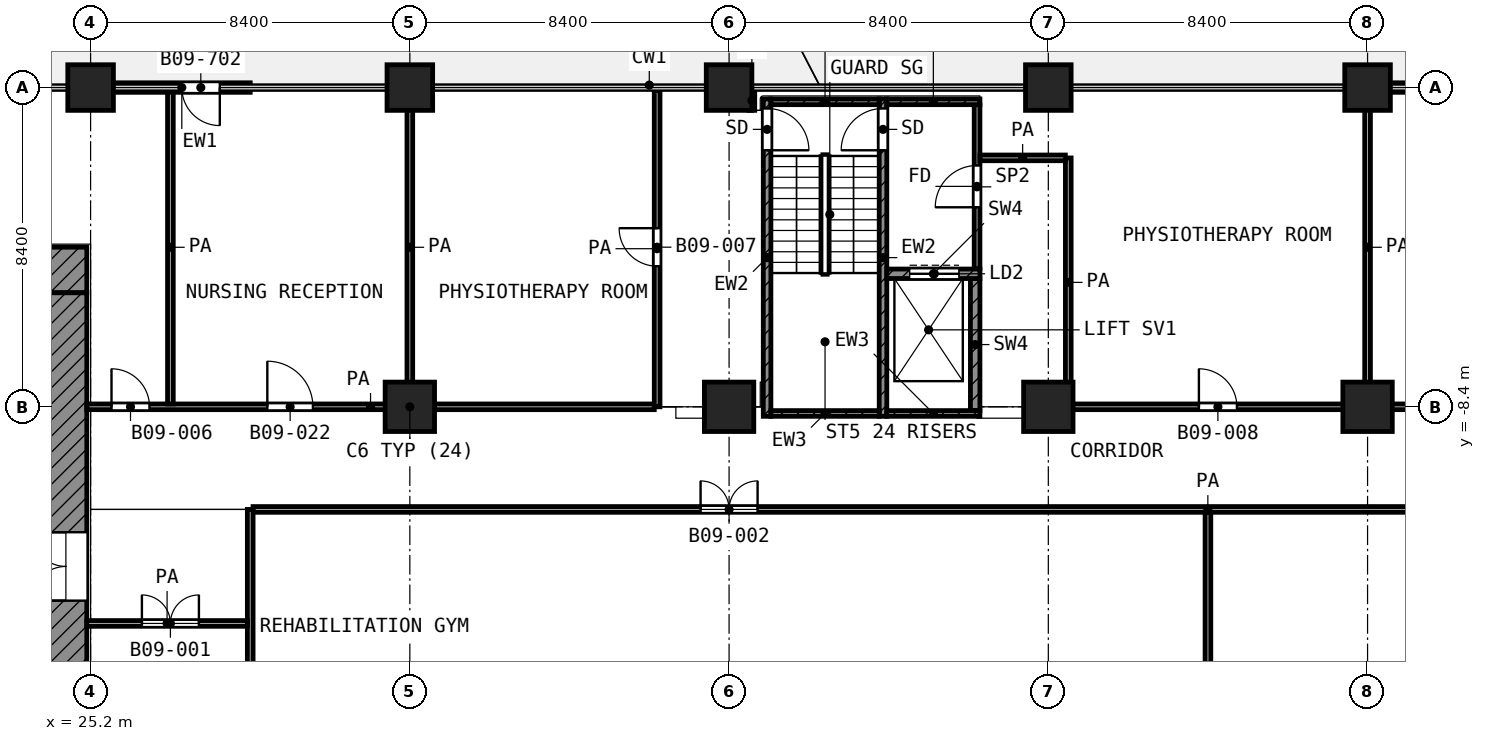
"""IFC4 building model, lengths in metres.
Left out: names, types, materials, properties, quantities, classifications, styles, units other than length and angle.
Written with IfcOpenShell. Run it as: python <this file> out.ifc"""

import sys

from ifc_helpers import new_model, si_unit, direction, frame, frame_2d, origin, origin_2d, place, context, subcontext, project, spatial, rectangle, extrude, element, fill, save


model = new_model("IFC4")
c1 = context("Model", 3, precision=1e-05, world=origin(), true_north=direction((0.0, 1.0)))
c2 = subcontext(c1, "Body", "Model", "MODEL_VIEW")
j1 = project(units=[si_unit("LENGTHUNIT", "METRE"), si_unit("PLANEANGLEUNIT", "RADIAN")], contexts=[c1])
p1 = place(None, origin())
s1 = spatial("IfcSite", under=j1, at=p1, CompositionType="ELEMENT")
p2 = place(p1, origin())
s2 = spatial("IfcBuilding", under=s1, at=p2, CompositionType="ELEMENT")
p3 = place(p2, frame((0.0, 0.0, 43.4)))
s3 = spatial("IfcBuildingStorey", under=s2, at=p3, CompositionType="ELEMENT", Elevation=43.4)
for number, where, z_axis, x_axis in (
    (1, (25.2, 0.0, 0.0), (0.0, 0.0, 1.0), (1.0, 0.0, 0.0)),
    (2, (33.6, 0.0, 0.0), (0.0, 0.0, 1.0), (1.0, 0.0, 0.0)),
    (3, (42.0, 0.0, 0.0), (0.0, 0.0, 1.0), (1.0, 0.0, 0.0)),
    (4, (50.4, 0.0, 0.0), (0.0, 0.0, 1.0), (1.0, 0.0, 0.0)),
    (5, (58.8, 0.0, 0.0), (0.0, 0.0, 1.0), (1.0, 0.0, 0.0)),
):
    element("IfcColumn", number, at=place(p3, frame(where, z_axis=z_axis, x_axis=x_axis)), inside=s3, PredefinedType="COLUMN", context=c2, shape_type="SweptSolid", body=[
        extrude(rectangle(XDim=1.2, YDim=1.2, at=origin_2d()), origin(), (0.0, 0.0, 1.0), 4.2),
    ])
for number, where, z_axis, x_axis in (
    (6, (33.6, -8.4, 0.0), (0.0, 0.0, 1.0), (1.0, 0.0, 0.0)),
    (7, (42.0, -8.4, 0.0), (0.0, 0.0, 1.0), (1.0, 0.0, 0.0)),
    (8, (50.4, -8.4, 0.0), (0.0, 0.0, 1.0), (1.0, 0.0, 0.0)),
    (9, (58.8, -8.4, 0.0), (0.0, 0.0, 1.0), (1.0, 0.0, 0.0)),
):
    element("IfcColumn", number, at=place(p3, frame(where, z_axis=z_axis, x_axis=x_axis)), inside=s3, PredefinedType="COLUMN", context=c2, shape_type="SweptSolid", body=[
        extrude(rectangle(XDim=1.3, YDim=1.3, at=origin_2d()), origin(), (0.0, 0.0, 1.0), 4.2),
    ])
p4 = place(p3, frame((63.0, 0.0, 0.0), z_axis=(0.0, 0.0, 1.0), x_axis=(-1.0, 0.0, 0.0)))
e10 = element("IfcWall", 10, at=p4, inside=s3, PredefinedType="SOLIDWALL", context=c2, shape_type="SweptSolid", body=[
    extrude(rectangle(XDim=3.6, YDim=0.25, at=frame_2d((1.8, 0.0))), origin(), (0.0, 0.0, 1.0), 3.78),
])
p5 = place(p4, frame((0.9, 0.0, 0.0)))
e11 = element("IfcOpeningElement", 11, at=p5, cuts=e10, PredefinedType="OPENING", context=c2, shape_type="SweptSolid", body=[
    extrude(rectangle(XDim=1.8, YDim=2.1, at=frame_2d((0.9, 1.05))), frame((0.0, 0.135, 0.0), z_axis=(0.0, -1.0, 0.0), x_axis=(1.0, 0.0, 0.0)), (0.0, 0.0, 1.0), 0.27),
])
p6 = place(p3, frame((29.4, 0.0, 0.0), z_axis=(0.0, 0.0, 1.0), x_axis=(-1.0, 0.0, 0.0)))
e12 = element("IfcWall", 12, at=p6, inside=s3, PredefinedType="SOLIDWALL", context=c2, shape_type="SweptSolid", body=[
    extrude(rectangle(XDim=3.6, YDim=0.25, at=frame_2d((1.8, 0.0))), origin(), (0.0, 0.0, 1.0), 3.78),
])
p7 = place(p6, frame((0.8, 0.0, 0.0)))
e13 = element("IfcOpeningElement", 13, at=p7, cuts=e12, PredefinedType="OPENING", context=c2, shape_type="SweptSolid", body=[
    extrude(rectangle(XDim=1.0, YDim=2.1, at=frame_2d((0.5, 1.05))), frame((0.0, 0.135, 0.0), z_axis=(0.0, -1.0, 0.0), x_axis=(1.0, 0.0, 0.0)), (0.0, 0.0, 1.0), 0.27),
])
p8 = place(p3, frame((4.2, -4.8, 0.0), z_axis=(0.0, 0.0, 1.0), x_axis=(1.0, 0.0, 0.0)))
e14 = element("IfcWall", 14, at=p8, inside=s3, PredefinedType="SHEAR", context=c2, shape_type="SweptSolid", body=[
    extrude(rectangle(XDim=20.9, YDim=1.2, at=frame_2d((10.45, 0.0))), origin(), (0.0, 0.0, 1.0), 3.9),
])
p9 = place(p8, frame((1.95, 0.0, 0.0)))
e15 = element("IfcOpeningElement", 15, at=p9, cuts=e14, PredefinedType="OPENING", context=c2, shape_type="SweptSolid", body=[
    extrude(rectangle(XDim=1.1, YDim=2.1, at=frame_2d((0.55, 1.05))), frame((0.0, 0.61, 0.0), z_axis=(0.0, -1.0, 0.0), x_axis=(1.0, 0.0, 0.0)), (0.0, 0.0, 1.0), 1.22),
])
p10 = place(p8, frame((17.95, 0.0, 0.0)))
e16 = element("IfcOpeningElement", 16, at=p10, cuts=e14, PredefinedType="OPENING", context=c2, shape_type="SweptSolid", body=[
    extrude(rectangle(XDim=1.1, YDim=2.1, at=frame_2d((0.55, 1.05))), frame((0.0, 0.61, 0.0), z_axis=(0.0, -1.0, 0.0), x_axis=(1.0, 0.0, 0.0)), (0.0, 0.0, 1.0), 1.22),
])
p11 = place(p3, frame((24.55, -24.0, 0.0), z_axis=(0.0, 0.0, 1.0), x_axis=(0.0, 1.0, 0.0)))
e17 = element("IfcWall", 17, at=p11, inside=s3, PredefinedType="SHEAR", context=c2, shape_type="SweptSolid", body=[
    extrude(rectangle(XDim=18.6, YDim=1.1, at=frame_2d((9.3, 0.0))), origin(), (0.0, 0.0, 1.0), 3.9),
])
p12 = place(p11, frame((10.5, 0.0, 0.0)))
e18 = element("IfcOpeningElement", 18, at=p12, cuts=e17, PredefinedType="OPENING", context=c2, shape_type="SweptSolid", body=[
    extrude(rectangle(XDim=1.8, YDim=2.1, at=frame_2d((0.9, 1.05))), frame((0.0, 0.56, 0.0), z_axis=(0.0, -1.0, 0.0), x_axis=(1.0, 0.0, 0.0)), (0.0, 0.0, 1.0), 1.12),
])
p13 = place(p3, frame((43.0, -8.65, 0.0), z_axis=(0.0, 0.0, 1.0), x_axis=(0.0, 1.0, 0.0)))
e19 = element("IfcWall", 19, at=p13, inside=s3, PredefinedType="SHEAR", context=c2, shape_type="SweptSolid", body=[
    extrude(rectangle(XDim=8.35, YDim=0.2, at=frame_2d((4.175, 0.0))), origin(), (0.0, 0.0, 1.0), 3.9),
])
p14 = place(p13, frame((7.0, 0.0, 0.0)))
e20 = element("IfcOpeningElement", 20, at=p14, cuts=e19, PredefinedType="OPENING", context=c2, shape_type="SweptSolid", body=[
    extrude(rectangle(XDim=1.1, YDim=2.1, at=frame_2d((0.55, 1.05))), frame((0.0, 0.11, 0.0), z_axis=(0.0, -1.0, 0.0), x_axis=(1.0, 0.0, 0.0)), (0.0, 0.0, 1.0), 0.22),
])
p15 = place(p3, frame((46.05, -8.65, 0.0), z_axis=(0.0, 0.0, 1.0), x_axis=(0.0, 1.0, 0.0)))
e21 = element("IfcWall", 21, at=p15, inside=s3, PredefinedType="SHEAR", context=c2, shape_type="SweptSolid", body=[
    extrude(rectangle(XDim=8.35, YDim=0.2, at=frame_2d((4.175, 0.0))), origin(), (0.0, 0.0, 1.0), 3.9),
])
p16 = place(p15, frame((7.0, 0.0, 0.0)))
e22 = element("IfcOpeningElement", 22, at=p16, cuts=e21, PredefinedType="OPENING", context=c2, shape_type="SweptSolid", body=[
    extrude(rectangle(XDim=1.1, YDim=2.1, at=frame_2d((0.55, 1.05))), frame((0.0, 0.11, 0.0), z_axis=(0.0, -1.0, 0.0), x_axis=(1.0, 0.0, 0.0)), (0.0, 0.0, 1.0), 0.22),
])
p17 = place(p3, frame((43.1, -0.375, 0.0), z_axis=(0.0, 0.0, 1.0), x_axis=(1.0, 0.0, 0.0)))
e23 = element("IfcWall", 23, at=p17, inside=s3, PredefinedType="SHEAR", context=c2, shape_type="SweptSolid", body=[
    extrude(rectangle(XDim=2.85, YDim=0.15, at=frame_2d((1.425, 0.0))), origin(), (0.0, 0.0, 1.0), 3.9),
])
p18 = place(p3, frame((46.15, -0.375, 0.0), z_axis=(0.0, 0.0, 1.0), x_axis=(1.0, 0.0, 0.0)))
e24 = element("IfcWall", 24, at=p18, inside=s3, PredefinedType="SHEAR", context=c2, shape_type="SweptSolid", body=[
    extrude(rectangle(XDim=2.45, YDim=0.15, at=frame_2d((1.225, 0.0))), origin(), (0.0, 0.0, 1.0), 3.9),
])
p19 = place(p3, frame((43.1, -8.575, 0.0), z_axis=(0.0, 0.0, 1.0), x_axis=(1.0, 0.0, 0.0)))
e25 = element("IfcWall", 25, at=p19, inside=s3, PredefinedType="SHEAR", context=c2, shape_type="SweptSolid", body=[
    extrude(rectangle(XDim=2.85, YDim=0.15, at=frame_2d((1.425, 0.0))), origin(), (0.0, 0.0, 1.0), 3.9),
])
p20 = place(p3, frame((46.15, -8.575, 0.0), z_axis=(0.0, 0.0, 1.0), x_axis=(1.0, 0.0, 0.0)))
e26 = element("IfcWall", 26, at=p20, inside=s3, PredefinedType="SHEAR", context=c2, shape_type="SweptSolid", body=[
    extrude(rectangle(XDim=2.45, YDim=0.15, at=frame_2d((1.225, 0.0))), origin(), (0.0, 0.0, 1.0), 3.9),
])
p21 = place(p3, frame((46.15, -4.9, 0.0), z_axis=(0.0, 0.0, 1.0), x_axis=(1.0, 0.0, 0.0)))
e27 = element("IfcWall", 27, at=p21, inside=s3, PredefinedType="SHEAR", context=c2, shape_type="SweptSolid", body=[
    extrude(rectangle(XDim=2.45, YDim=0.25, at=frame_2d((1.225, 0.0))), origin(), (0.0, 0.0, 1.0), 3.9),
])
p22 = place(p21, frame((0.6, 0.0, 0.0)))
e28 = element("IfcOpeningElement", 28, at=p22, cuts=e27, PredefinedType="OPENING", context=c2, shape_type="SweptSolid", body=[
    extrude(rectangle(XDim=1.3, YDim=2.1, at=frame_2d((0.65, 1.05))), frame((0.0, 0.135, 0.0), z_axis=(0.0, -1.0, 0.0), x_axis=(1.0, 0.0, 0.0)), (0.0, 0.0, 1.0), 0.27),
])
p23 = place(p3, frame((48.475, -8.5, 0.0), z_axis=(0.0, 0.0, 1.0), x_axis=(0.0, 1.0, 0.0)))
e29 = element("IfcWall", 29, at=p23, inside=s3, PredefinedType="SHEAR", context=c2, shape_type="SweptSolid", body=[
    extrude(rectangle(XDim=3.475, YDim=0.25, at=frame_2d((1.738, 0.0))), origin(), (0.0, 0.0, 1.0), 3.9),
])
p24 = place(p3, frame((48.525, -4.775, 0.0), z_axis=(0.0, 0.0, 1.0), x_axis=(0.0, 1.0, 0.0)))
e30 = element("IfcWall", 30, at=p24, inside=s3, PredefinedType="PARTITIONING", context=c2, shape_type="SweptSolid", body=[
    extrude(rectangle(XDim=4.325, YDim=0.15, at=frame_2d((2.163, 0.0))), origin(), (0.0, 0.0, 1.0), 3.9),
])
p25 = place(p24, frame((1.625, 0.0, 0.0)))
e31 = element("IfcOpeningElement", 31, at=p25, cuts=e30, PredefinedType="OPENING", context=c2, shape_type="SweptSolid", body=[
    extrude(rectangle(XDim=1.1, YDim=2.1, at=frame_2d((0.55, 1.05))), frame((0.0, 0.085, 0.0), z_axis=(0.0, -1.0, 0.0), x_axis=(1.0, 0.0, 0.0)), (0.0, 0.0, 1.0), 0.17),
])
p26 = place(p3, frame((25.1, -14.1, 0.0), z_axis=(0.0, 0.0, 1.0), x_axis=(1.0, 0.0, 0.0)))
e32 = element("IfcWall", 32, at=p26, inside=s3, PredefinedType="PARTITIONING", context=c2, shape_type="SweptSolid", body=[
    extrude(rectangle(XDim=4.225, YDim=0.15, at=frame_2d((2.112, 0.0))), origin(), (0.0, 0.0, 1.0), 3.9),
])
p27 = place(p26, frame((1.45, 0.0, 0.0)))
e33 = element("IfcOpeningElement", 33, at=p27, cuts=e32, PredefinedType="OPENING", context=c2, shape_type="SweptSolid", body=[
    extrude(rectangle(XDim=1.5, YDim=2.1, at=frame_2d((0.75, 1.05))), frame((0.0, 0.085, 0.0), z_axis=(0.0, -1.0, 0.0), x_axis=(1.0, 0.0, 0.0)), (0.0, 0.0, 1.0), 0.17),
])
p28 = place(p3, frame((29.475, -11.1, 0.0), z_axis=(0.0, 0.0, 1.0), x_axis=(1.0, 0.0, 0.0)))
e34 = element("IfcWall", 34, at=p28, inside=s3, PredefinedType="PARTITIONING", context=c2, shape_type="SweptSolid", body=[
    extrude(rectangle(XDim=50.245, YDim=0.15, at=frame_2d((25.123, 0.0))), origin(), (0.0, 0.0, 1.0), 3.9),
])
p29 = place(p28, frame((11.775, 0.0, 0.0)))
e35 = element("IfcOpeningElement", 35, at=p29, cuts=e34, PredefinedType="OPENING", context=c2, shape_type="SweptSolid", body=[
    extrude(rectangle(XDim=1.5, YDim=2.1, at=frame_2d((0.75, 1.05))), frame((0.0, 0.085, 0.0), z_axis=(0.0, -1.0, 0.0), x_axis=(1.0, 0.0, 0.0)), (0.0, 0.0, 1.0), 0.17),
])
p30 = place(p28, frame((36.975, 0.0, 0.0)))
e36 = element("IfcOpeningElement", 36, at=p30, cuts=e34, PredefinedType="OPENING", context=c2, shape_type="SweptSolid", body=[
    extrude(rectangle(XDim=1.5, YDim=2.1, at=frame_2d((0.75, 1.05))), frame((0.0, 0.085, 0.0), z_axis=(0.0, -1.0, 0.0), x_axis=(1.0, 0.0, 0.0)), (0.0, 0.0, 1.0), 0.17),
])
p31 = place(p3, frame((25.1, -8.4, 0.0), z_axis=(0.0, 0.0, 1.0), x_axis=(1.0, 0.0, 0.0)))
e37 = element("IfcWall", 37, at=p31, inside=s3, PredefinedType="PARTITIONING", context=c2, shape_type="SweptSolid", body=[
    extrude(rectangle(XDim=14.932, YDim=0.15, at=frame_2d((7.466, 0.0))), origin(), (0.0, 0.0, 1.0), 3.9),
])
p32 = place(p31, frame((0.65, 0.0, 0.0)))
e38 = element("IfcOpeningElement", 38, at=p32, cuts=e37, PredefinedType="OPENING", context=c2, shape_type="SweptSolid", body=[
    extrude(rectangle(XDim=1.0, YDim=2.1, at=frame_2d((0.5, 1.05))), frame((0.0, 0.085, 0.0), z_axis=(0.0, -1.0, 0.0), x_axis=(1.0, 0.0, 0.0)), (0.0, 0.0, 1.0), 0.17),
])
p33 = place(p31, frame((4.75, 0.0, 0.0)))
e39 = element("IfcOpeningElement", 39, at=p33, cuts=e37, PredefinedType="OPENING", context=c2, shape_type="SweptSolid", body=[
    extrude(rectangle(XDim=1.2, YDim=2.1, at=frame_2d((0.6, 1.05))), frame((0.0, 0.085, 0.0), z_axis=(0.0, -1.0, 0.0), x_axis=(1.0, 0.0, 0.0)), (0.0, 0.0, 1.0), 0.17),
])
p34 = place(p3, frame((51.0, -8.4, 0.0), z_axis=(0.0, 0.0, 1.0), x_axis=(1.0, 0.0, 0.0)))
e40 = element("IfcWall", 40, at=p34, inside=s3, PredefinedType="PARTITIONING", context=c2, shape_type="SweptSolid", body=[
    extrude(rectangle(XDim=28.72, YDim=0.15, at=frame_2d((14.36, 0.0))), origin(), (0.0, 0.0, 1.0), 3.9),
])
p35 = place(p34, frame((3.362, 0.0, 0.0)))
e41 = element("IfcOpeningElement", 41, at=p35, cuts=e40, PredefinedType="OPENING", context=c2, shape_type="SweptSolid", body=[
    extrude(rectangle(XDim=1.0, YDim=2.1, at=frame_2d((0.5, 1.05))), frame((0.0, 0.085, 0.0), z_axis=(0.0, -1.0, 0.0), x_axis=(1.0, 0.0, 0.0)), (0.0, 0.0, 1.0), 0.17),
])
p36 = place(p34, frame((11.5, 0.0, 0.0)))
e42 = element("IfcOpeningElement", 42, at=p36, cuts=e40, PredefinedType="OPENING", context=c2, shape_type="SweptSolid", body=[
    extrude(rectangle(XDim=1.0, YDim=2.1, at=frame_2d((0.5, 1.05))), frame((0.0, 0.085, 0.0), z_axis=(0.0, -1.0, 0.0), x_axis=(1.0, 0.0, 0.0)), (0.0, 0.0, 1.0), 0.17),
])
p37 = place(p34, frame((17.8, 0.0, 0.0)))
e43 = element("IfcOpeningElement", 43, at=p37, cuts=e40, PredefinedType="OPENING", context=c2, shape_type="SweptSolid", body=[
    extrude(rectangle(XDim=1.0, YDim=2.1, at=frame_2d((0.5, 1.05))), frame((0.0, 0.085, 0.0), z_axis=(0.0, -1.0, 0.0), x_axis=(1.0, 0.0, 0.0)), (0.0, 0.0, 1.0), 0.17),
])
p38 = place(p34, frame((22.9, 0.0, 0.0)))
e44 = element("IfcOpeningElement", 44, at=p38, cuts=e40, PredefinedType="OPENING", context=c2, shape_type="SweptSolid", body=[
    extrude(rectangle(XDim=1.0, YDim=2.1, at=frame_2d((0.5, 1.05))), frame((0.0, 0.085, 0.0), z_axis=(0.0, -1.0, 0.0), x_axis=(1.0, 0.0, 0.0)), (0.0, 0.0, 1.0), 0.17),
])
p39 = place(p3, frame((48.6, -1.85, 0.0), z_axis=(0.0, 0.0, 1.0), x_axis=(1.0, 0.0, 0.0)))
e45 = element("IfcWall", 45, at=p39, inside=s3, PredefinedType="PARTITIONING", context=c2, shape_type="SweptSolid", body=[
    extrude(rectangle(XDim=2.248, YDim=0.15, at=frame_2d((1.124, 0.0))), origin(), (0.0, 0.0, 1.0), 3.9),
])
p40 = place(p3, frame((27.3, -8.325, 0.0), z_axis=(0.0, 0.0, 1.0), x_axis=(0.0, 1.0, 0.0)))
e46 = element("IfcWall", 46, at=p40, inside=s3, PredefinedType="PARTITIONING", context=c2, shape_type="SweptSolid", body=[
    extrude(rectangle(XDim=8.245, YDim=0.15, at=frame_2d((4.123, 0.0))), origin(), (0.0, 0.0, 1.0), 3.9),
])
p41 = place(p3, frame((29.4, -25.2, 0.0), z_axis=(0.0, 0.0, 1.0), x_axis=(0.0, 1.0, 0.0)))
e47 = element("IfcWall", 47, at=p41, inside=s3, PredefinedType="PARTITIONING", context=c2, shape_type="SweptSolid", body=[
    extrude(rectangle(XDim=14.1, YDim=0.15, at=frame_2d((7.05, 0.0))), origin(), (0.0, 0.0, 1.0), 3.9),
])
p42 = place(p3, frame((33.6, -8.325, 0.0), z_axis=(0.0, 0.0, 1.0), x_axis=(0.0, 1.0, 0.0)))
e48 = element("IfcWall", 48, at=p42, inside=s3, PredefinedType="PARTITIONING", context=c2, shape_type="SweptSolid", body=[
    extrude(rectangle(XDim=8.245, YDim=0.15, at=frame_2d((4.123, 0.0))), origin(), (0.0, 0.0, 1.0), 3.9),
])
p43 = place(p3, frame((40.107, -8.4, 0.0), z_axis=(0.0, 0.0, 1.0), x_axis=(0.0, 1.0, 0.0)))
e49 = element("IfcWall", 49, at=p43, inside=s3, PredefinedType="PARTITIONING", context=c2, shape_type="SweptSolid", body=[
    extrude(rectangle(XDim=8.32, YDim=0.15, at=frame_2d((4.16, 0.0))), origin(), (0.0, 0.0, 1.0), 3.9),
])
p44 = place(p43, frame((3.7, 0.0, 0.0)))
e50 = element("IfcOpeningElement", 50, at=p44, cuts=e49, PredefinedType="OPENING", context=c2, shape_type="SweptSolid", body=[
    extrude(rectangle(XDim=1.0, YDim=2.1, at=frame_2d((0.5, 1.05))), frame((0.0, 0.085, 0.0), z_axis=(0.0, -1.0, 0.0), x_axis=(1.0, 0.0, 0.0)), (0.0, 0.0, 1.0), 0.17),
])
p45 = place(p3, frame((42.6, -0.599, 0.0), z_axis=(0.0, 0.0, 1.0), x_axis=(0.0, 1.0, 0.0)))
e51 = element("IfcWall", 51, at=p45, inside=s3, PredefinedType="PARTITIONING", context=c2, shape_type="SweptSolid", body=[
    extrude(rectangle(XDim=0.519, YDim=0.15, at=frame_2d((0.26, 0.0))), origin(), (0.0, 0.0, 1.0), 3.9),
])
p46 = place(p3, frame((50.925, -8.4, 0.0), z_axis=(0.0, 0.0, 1.0), x_axis=(0.0, 1.0, 0.0)))
e52 = element("IfcWall", 52, at=p46, inside=s3, PredefinedType="PARTITIONING", context=c2, shape_type="SweptSolid", body=[
    extrude(rectangle(XDim=6.548, YDim=0.15, at=frame_2d((3.274, 0.0))), origin(), (0.0, 0.0, 1.0), 3.9),
])
p47 = place(p3, frame((54.6, -25.12, 0.0), z_axis=(0.0, 0.0, 1.0), x_axis=(0.0, 1.0, 0.0)))
e53 = element("IfcWall", 53, at=p47, inside=s3, PredefinedType="PARTITIONING", context=c2, shape_type="SweptSolid", body=[
    extrude(rectangle(XDim=13.945, YDim=0.15, at=frame_2d((6.973, 0.0))), origin(), (0.0, 0.0, 1.0), 3.9),
])
p48 = place(p3, frame((58.8, -8.325, 0.0), z_axis=(0.0, 0.0, 1.0), x_axis=(0.0, 1.0, 0.0)))
e54 = element("IfcWall", 54, at=p48, inside=s3, PredefinedType="PARTITIONING", context=c2, shape_type="SweptSolid", body=[
    extrude(rectangle(XDim=8.245, YDim=0.15, at=frame_2d((4.123, 0.0))), origin(), (0.0, 0.0, 1.0), 3.9),
])
p49 = place(p7, origin())
e55 = element("IfcDoor", 55, at=p49, inside=s3, OperationType="SINGLE_SWING_LEFT", PredefinedType="DOOR", context=c2, shape_type="SweptSolid", body=[
    extrude(rectangle(XDim=1.0, YDim=2.1, at=frame_2d((0.5, 1.05))), frame((0.0, 0.025, 0.0), z_axis=(0.0, -1.0, 0.0), x_axis=(1.0, 0.0, 0.0)), (0.0, 0.0, 1.0), 0.05),
])
fill(e13, e55)
p50 = place(p12, origin())
e56 = element("IfcDoor", 56, at=p50, inside=s3, OperationType="DOUBLE_DOOR_SINGLE_SWING", PredefinedType="DOOR", context=c2, shape_type="SweptSolid", body=[
    extrude(rectangle(XDim=1.8, YDim=2.1, at=frame_2d((0.9, 1.05))), frame((0.0, 0.025, 0.0), z_axis=(0.0, -1.0, 0.0), x_axis=(1.0, 0.0, 0.0)), (0.0, 0.0, 1.0), 0.05),
])
fill(e18, e56)
p51 = place(p14, frame((1.1, 0.0, 0.0), z_axis=(0.0, 0.0, 1.0), x_axis=(-1.0, 0.0, 0.0)))
e57 = element("IfcDoor", 57, at=p51, inside=s3, OperationType="SINGLE_SWING_LEFT", PredefinedType="DOOR", context=c2, shape_type="SweptSolid", body=[
    extrude(rectangle(XDim=1.1, YDim=2.1, at=frame_2d((0.55, 1.05))), frame((0.0, 0.025, 0.0), z_axis=(0.0, -1.0, 0.0), x_axis=(1.0, 0.0, 0.0)), (0.0, 0.0, 1.0), 0.05),
])
fill(e20, e57)
p52 = place(p16, origin())
e58 = element("IfcDoor", 58, at=p52, inside=s3, OperationType="SINGLE_SWING_LEFT", PredefinedType="DOOR", context=c2, shape_type="SweptSolid", body=[
    extrude(rectangle(XDim=1.1, YDim=2.1, at=frame_2d((0.55, 1.05))), frame((0.0, 0.025, 0.0), z_axis=(0.0, -1.0, 0.0), x_axis=(1.0, 0.0, 0.0)), (0.0, 0.0, 1.0), 0.05),
])
fill(e22, e58)
p53 = place(p22, origin())
e59 = element("IfcDoor", 59, at=p53, inside=s3, OperationType="DOUBLE_DOOR_SLIDING", PredefinedType="DOOR", context=c2, shape_type="SweptSolid", body=[
    extrude(rectangle(XDim=1.3, YDim=2.1, at=frame_2d((0.65, 1.05))), frame((0.0, 0.025, 0.0), z_axis=(0.0, -1.0, 0.0), x_axis=(1.0, 0.0, 0.0)), (0.0, 0.0, 1.0), 0.05),
])
fill(e28, e59)
p54 = place(p25, origin())
e60 = element("IfcDoor", 60, at=p54, inside=s3, OperationType="SINGLE_SWING_LEFT", PredefinedType="DOOR", context=c2, shape_type="SweptSolid", body=[
    extrude(rectangle(XDim=1.1, YDim=2.1, at=frame_2d((0.55, 1.05))), frame((0.0, 0.025, 0.0), z_axis=(0.0, -1.0, 0.0), x_axis=(1.0, 0.0, 0.0)), (0.0, 0.0, 1.0), 0.05),
])
fill(e31, e60)
p55 = place(p27, origin())
e61 = element("IfcDoor", 61, at=p55, inside=s3, OperationType="DOUBLE_DOOR_SINGLE_SWING", PredefinedType="DOOR", context=c2, shape_type="SweptSolid", body=[
    extrude(rectangle(XDim=1.5, YDim=2.1, at=frame_2d((0.75, 1.05))), frame((0.0, 0.025, 0.0), z_axis=(0.0, -1.0, 0.0), x_axis=(1.0, 0.0, 0.0)), (0.0, 0.0, 1.0), 0.05),
])
fill(e33, e61)
p56 = place(p44, origin())
e62 = element("IfcDoor", 62, at=p56, inside=s3, OperationType="SINGLE_SWING_RIGHT", PredefinedType="DOOR", context=c2, shape_type="SweptSolid", body=[
    extrude(rectangle(XDim=1.0, YDim=2.1, at=frame_2d((0.5, 1.05))), frame((0.0, 0.025, 0.0), z_axis=(0.0, -1.0, 0.0), x_axis=(1.0, 0.0, 0.0)), (0.0, 0.0, 1.0), 0.05),
])
fill(e50, e62)
p57 = place(p35, origin())
e63 = element("IfcDoor", 63, at=p57, inside=s3, OperationType="SINGLE_SWING_LEFT", PredefinedType="DOOR", context=c2, shape_type="SweptSolid", body=[
    extrude(rectangle(XDim=1.0, YDim=2.1, at=frame_2d((0.5, 1.05))), frame((0.0, 0.025, 0.0), z_axis=(0.0, -1.0, 0.0), x_axis=(1.0, 0.0, 0.0)), (0.0, 0.0, 1.0), 0.05),
])
fill(e41, e63)
p58 = place(p29, origin())
e64 = element("IfcDoor", 64, at=p58, inside=s3, OperationType="DOUBLE_DOOR_SINGLE_SWING", PredefinedType="DOOR", context=c2, shape_type="SweptSolid", body=[
    extrude(rectangle(XDim=1.5, YDim=2.1, at=frame_2d((0.75, 1.05))), frame((0.0, 0.025, 0.0), z_axis=(0.0, -1.0, 0.0), x_axis=(1.0, 0.0, 0.0)), (0.0, 0.0, 1.0), 0.05),
])
fill(e35, e64)
p59 = place(p32, origin())
e65 = element("IfcDoor", 65, at=p59, inside=s3, OperationType="SINGLE_SWING_LEFT", PredefinedType="DOOR", context=c2, shape_type="SweptSolid", body=[
    extrude(rectangle(XDim=1.0, YDim=2.1, at=frame_2d((0.5, 1.05))), frame((0.0, 0.025, 0.0), z_axis=(0.0, -1.0, 0.0), x_axis=(1.0, 0.0, 0.0)), (0.0, 0.0, 1.0), 0.05),
])
fill(e38, e65)
p60 = place(p33, origin())
e66 = element("IfcDoor", 66, at=p60, inside=s3, OperationType="SINGLE_SWING_LEFT", PredefinedType="DOOR", context=c2, shape_type="SweptSolid", body=[
    extrude(rectangle(XDim=1.2, YDim=2.1, at=frame_2d((0.6, 1.05))), frame((0.0, 0.025, 0.0), z_axis=(0.0, -1.0, 0.0), x_axis=(1.0, 0.0, 0.0)), (0.0, 0.0, 1.0), 0.05),
])
fill(e39, e66)
save(model, sys.argv[1])
